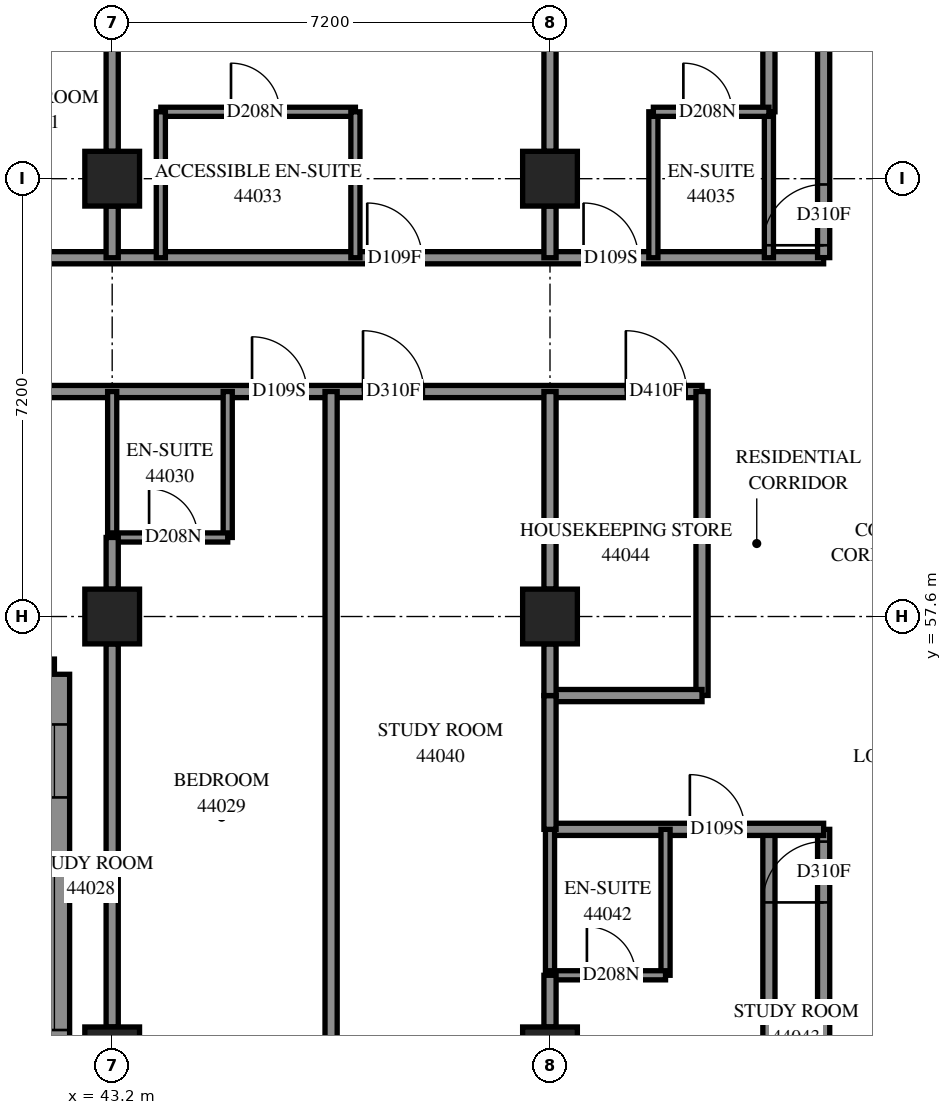
"""IFC4 building model, lengths in metres.
Left out: names, types, materials, properties, quantities, classifications, styles, units other than length and angle.
Written with IfcOpenShell. Run it as: python <this file> out.ifc"""

import sys

from ifc_helpers import new_model, si_unit, direction, frame, frame_2d, origin, origin_2d, place, context, subcontext, project, spatial, polyline, rectangle, outline, extrude, element, fill, save


model = new_model("IFC4")
c1 = context("Model", 3, precision=1e-05, world=origin(), true_north=direction((0.0, 1.0)))
c2 = subcontext(c1, "Body", "Model", "MODEL_VIEW")
j1 = project(units=[si_unit("LENGTHUNIT", "METRE"), si_unit("PLANEANGLEUNIT", "RADIAN")], contexts=[c1])
p1 = place(None, origin())
s1 = spatial("IfcSite", under=j1, at=p1, CompositionType="ELEMENT")
p2 = place(p1, origin())
s2 = spatial("IfcBuilding", under=s1, at=p2, CompositionType="ELEMENT")
p3 = place(p2, frame((0.0, 0.0, 162.6)))
s3 = spatial("IfcBuildingStorey", under=s2, at=p3, CompositionType="ELEMENT", Elevation=162.6)
for number, where, z_axis, x_axis in (
    (1, (43.2, 50.4, 0.0), (0.0, 0.0, 1.0), (1.0, 0.0, 0.0)),
    (2, (43.2, 57.6, 0.0), (0.0, 0.0, 1.0), (1.0, 0.0, 0.0)),
    (3, (43.2, 64.8, 0.0), (0.0, 0.0, 1.0), (1.0, 0.0, 0.0)),
    (4, (50.4, 50.4, 0.0), (0.0, 0.0, 1.0), (1.0, 0.0, 0.0)),
    (5, (50.4, 57.6, 0.0), (0.0, 0.0, 1.0), (1.0, 0.0, 0.0)),
    (6, (50.4, 64.8, 0.0), (0.0, 0.0, 1.0), (1.0, 0.0, 0.0)),
):
    element("IfcColumn", number, at=place(p3, frame(where, z_axis=z_axis, x_axis=x_axis)), inside=s3, PredefinedType="COLUMN", context=c2, shape_type="SweptSolid", body=[
        extrude(rectangle(XDim=0.9, YDim=0.9, at=origin_2d()), origin(), (0.0, 0.0, 1.0), 3.1),
    ])
p4 = place(p3, frame((35.05, 56.65, 0.0), z_axis=(0.0, 0.0, 1.0), x_axis=(1.0, 0.0, 0.0)))
e7 = element("IfcWall", 7, at=p4, inside=s3, PredefinedType="SOLIDWALL", context=c2, shape_type="SweptSolid", body=[
    extrude(outline(polyline([(-0.25, -0.25), (6.95, -0.25), (7.45, 0.25), (0.25, 0.25), (-0.25, -0.25)])), origin(), (0.0, 0.0, 1.0), 3.1),
])
p5 = place(p4, frame((1.35, 0.0, 0.45)))
e8 = element("IfcOpeningElement", 8, at=p5, cuts=e7, PredefinedType="OPENING", context=c2, shape_type="SweptSolid", body=[
    extrude(rectangle(XDim=2.8, YDim=2.5, at=frame_2d((1.4, 1.25))), frame((0.0, 0.26, 0.0), z_axis=(0.0, -1.0, 0.0), x_axis=(1.0, 0.0, 0.0)), (0.0, 0.0, 1.0), 0.52),
])
p6 = place(p4, frame((5.175, 0.0, 0.45)))
e9 = element("IfcOpeningElement", 9, at=p6, cuts=e7, PredefinedType="OPENING", context=c2, shape_type="SweptSolid", body=[
    extrude(rectangle(XDim=1.2, YDim=2.5, at=frame_2d((0.6, 1.25))), frame((0.0, 0.26, 0.0), z_axis=(0.0, -1.0, 0.0), x_axis=(1.0, 0.0, 0.0)), (0.0, 0.0, 1.0), 0.52),
])
p7 = place(p3, frame((42.25, 56.65, 0.0), z_axis=(0.0, 0.0, 1.0), x_axis=(0.0, -1.0, 0.0)))
e10 = element("IfcWall", 10, at=p7, inside=s3, PredefinedType="SOLIDWALL", context=c2, shape_type="SweptSolid", body=[
    extrude(outline(polyline([(0.25, -0.25), (7.45, -0.25), (6.95, 0.25), (-0.25, 0.25), (0.25, -0.25)])), origin(), (0.0, 0.0, 1.0), 3.1),
])
p8 = place(p7, frame((3.05, 0.0, 0.45)))
e11 = element("IfcOpeningElement", 11, at=p8, cuts=e10, PredefinedType="OPENING", context=c2, shape_type="SweptSolid", body=[
    extrude(rectangle(XDim=2.8, YDim=2.5, at=frame_2d((1.4, 1.25))), frame((0.0, 0.26, 0.0), z_axis=(0.0, -1.0, 0.0), x_axis=(1.0, 0.0, 0.0)), (0.0, 0.0, 1.0), 0.52),
])
p9 = place(p7, frame((0.825, 0.0, 0.45)))
e12 = element("IfcOpeningElement", 12, at=p9, cuts=e10, PredefinedType="OPENING", context=c2, shape_type="SweptSolid", body=[
    extrude(rectangle(XDim=1.2, YDim=2.5, at=frame_2d((0.6, 1.25))), frame((0.0, 0.26, 0.0), z_axis=(0.0, -1.0, 0.0), x_axis=(1.0, 0.0, 0.0)), (0.0, 0.0, 1.0), 0.52),
])
p10 = place(p3, frame((36.0, 61.3, 0.0), z_axis=(0.0, 0.0, 1.0), x_axis=(1.0, 0.0, 0.0)))
e13 = element("IfcWall", 13, at=p10, inside=s3, PredefinedType="PARTITIONING", context=c2, shape_type="SweptSolid", body=[
    extrude(rectangle(XDim=16.9, YDim=0.2, at=frame_2d((8.45, 0.0))), origin(), (0.0, 0.0, 1.0), 3.1),
])
p11 = place(p10, frame((2.3, 0.0, 0.0)))
e14 = element("IfcOpeningElement", 14, at=p11, cuts=e13, PredefinedType="OPENING", context=c2, shape_type="SweptSolid", body=[
    extrude(rectangle(XDim=0.9, YDim=2.1, at=frame_2d((0.45, 1.05))), frame((0.0, 0.11, 0.0), z_axis=(0.0, -1.0, 0.0), x_axis=(1.0, 0.0, 0.0)), (0.0, 0.0, 1.0), 0.22),
])
p12 = place(p10, frame((4.125, 0.0, 0.0)))
e15 = element("IfcOpeningElement", 15, at=p12, cuts=e13, PredefinedType="OPENING", context=c2, shape_type="SweptSolid", body=[
    extrude(rectangle(XDim=1.0, YDim=2.1, at=frame_2d((0.5, 1.05))), frame((0.0, 0.11, 0.0), z_axis=(0.0, -1.0, 0.0), x_axis=(1.0, 0.0, 0.0)), (0.0, 0.0, 1.0), 0.22),
])
p13 = place(p10, frame((9.5, 0.0, 0.0)))
e16 = element("IfcOpeningElement", 16, at=p13, cuts=e13, PredefinedType="OPENING", context=c2, shape_type="SweptSolid", body=[
    extrude(rectangle(XDim=0.9, YDim=2.1, at=frame_2d((0.45, 1.05))), frame((0.0, 0.11, 0.0), z_axis=(0.0, -1.0, 0.0), x_axis=(1.0, 0.0, 0.0)), (0.0, 0.0, 1.0), 0.22),
])
p14 = place(p10, frame((11.325, 0.0, 0.0)))
e17 = element("IfcOpeningElement", 17, at=p14, cuts=e13, PredefinedType="OPENING", context=c2, shape_type="SweptSolid", body=[
    extrude(rectangle(XDim=1.0, YDim=2.1, at=frame_2d((0.5, 1.05))), frame((0.0, 0.11, 0.0), z_axis=(0.0, -1.0, 0.0), x_axis=(1.0, 0.0, 0.0)), (0.0, 0.0, 1.0), 0.22),
])
p15 = place(p10, frame((15.647, 0.0, 0.0)))
e18 = element("IfcOpeningElement", 18, at=p15, cuts=e13, PredefinedType="OPENING", context=c2, shape_type="SweptSolid", body=[
    extrude(rectangle(XDim=1.0, YDim=2.1, at=frame_2d((0.5, 1.05))), frame((0.0, 0.11, 0.0), z_axis=(0.0, -1.0, 0.0), x_axis=(1.0, 0.0, 0.0)), (0.0, 0.0, 1.0), 0.22),
])
p16 = place(p3, frame((40.702, 63.5, 0.0), z_axis=(0.0, 0.0, 1.0), x_axis=(1.0, 0.0, 0.0)))
e19 = element("IfcWall", 19, at=p16, inside=s3, PredefinedType="PARTITIONING", context=c2, shape_type="SweptSolid", body=[
    extrude(rectangle(XDim=14.198, YDim=0.2, at=frame_2d((7.099, 0.0))), origin(), (0.0, 0.0, 1.0), 3.1),
])
p17 = place(p16, frame((6.692, 0.0, 0.0)))
e20 = element("IfcOpeningElement", 20, at=p17, cuts=e19, PredefinedType="OPENING", context=c2, shape_type="SweptSolid", body=[
    extrude(rectangle(XDim=0.9, YDim=2.1, at=frame_2d((0.45, 1.05))), frame((0.0, 0.11, 0.0), z_axis=(0.0, -1.0, 0.0), x_axis=(1.0, 0.0, 0.0)), (0.0, 0.0, 1.0), 0.22),
])
p18 = place(p16, frame((10.25, 0.0, 0.0)))
e21 = element("IfcOpeningElement", 21, at=p18, cuts=e19, PredefinedType="OPENING", context=c2, shape_type="SweptSolid", body=[
    extrude(rectangle(XDim=0.9, YDim=2.1, at=frame_2d((0.45, 1.05))), frame((0.0, 0.11, 0.0), z_axis=(0.0, -1.0, 0.0), x_axis=(1.0, 0.0, 0.0)), (0.0, 0.0, 1.0), 0.22),
])
p19 = place(p3, frame((54.0, 42.285, 0.0), z_axis=(0.0, 0.0, 1.0), x_axis=(0.0, 1.0, 0.0)))
e22 = element("IfcWall", 22, at=p19, inside=s3, PredefinedType="PARTITIONING", context=c2, shape_type="SweptSolid", body=[
    extrude(rectangle(XDim=11.815, YDim=0.2, at=frame_2d((5.907, 0.0))), origin(), (0.0, 0.0, 1.0), 3.1),
])
p20 = place(p3, frame((46.8, 49.7, 0.0), z_axis=(0.0, 0.0, 1.0), x_axis=(0.0, 1.0, 0.0)))
e23 = element("IfcWall", 23, at=p20, inside=s3, PredefinedType="PARTITIONING", context=c2, shape_type="SweptSolid", body=[
    extrude(rectangle(XDim=11.6, YDim=0.2, at=frame_2d((5.8, 0.0))), origin(), (0.0, 0.0, 1.0), 3.1),
])
p21 = place(p3, frame((54.0, 65.9, 0.0), z_axis=(0.0, 0.0, 1.0), x_axis=(0.0, 1.0, 0.0)))
e24 = element("IfcWall", 24, at=p21, inside=s3, PredefinedType="PARTITIONING", context=c2, shape_type="SweptSolid", body=[
    extrude(rectangle(XDim=6.863, YDim=0.2, at=frame_2d((3.432, 0.0))), origin(), (0.0, 0.0, 1.0), 3.1),
])
p22 = place(p3, frame((54.9, 47.7, 0.0), z_axis=(0.0, 0.0, 1.0), x_axis=(0.0, 1.0, 0.0)))
e25 = element("IfcWall", 25, at=p22, inside=s3, PredefinedType="PARTITIONING", context=c2, shape_type="SweptSolid", body=[
    extrude(rectangle(XDim=6.4, YDim=0.2, at=frame_2d((3.2, 0.0))), origin(), (0.0, 0.0, 1.0), 3.1),
])
p23 = place(p22, frame((5.199, 0.0, 0.0)))
e26 = element("IfcOpeningElement", 26, at=p23, cuts=e25, PredefinedType="OPENING", context=c2, shape_type="SweptSolid", body=[
    extrude(rectangle(XDim=1.0, YDim=2.1, at=frame_2d((0.5, 1.05))), frame((0.0, 0.11, 0.0), z_axis=(0.0, -1.0, 0.0), x_axis=(1.0, 0.0, 0.0)), (0.0, 0.0, 1.0), 0.22),
])
p24 = place(p3, frame((43.2, 50.85, 0.0), z_axis=(0.0, 0.0, 1.0), x_axis=(0.0, 1.0, 0.0)))
e27 = element("IfcWall", 27, at=p24, inside=s3, PredefinedType="PARTITIONING", context=c2, shape_type="SweptSolid", body=[
    extrude(rectangle(XDim=6.3, YDim=0.2, at=frame_2d((3.15, 0.0))), origin(), (0.0, 0.0, 1.0), 2.6),
])
for number, where, z_axis, x_axis in (
    (28, (43.2, 65.25, 0.0), (0.0, 0.0, 1.0), (0.0, 1.0, 0.0)),
    (29, (50.4, 65.25, 0.0), (0.0, 0.0, 1.0), (0.0, 1.0, 0.0)),
):
    element("IfcWall", number, at=place(p3, frame(where, z_axis=z_axis, x_axis=x_axis)), inside=s3, PredefinedType="PARTITIONING", context=c2, shape_type="SweptSolid", body=[
        extrude(rectangle(XDim=6.3, YDim=0.2, at=frame_2d((3.15, 0.0))), origin(), (0.0, 0.0, 1.0), 3.1),
    ])
p25 = place(p3, frame((52.9, 56.302, 0.0), z_axis=(0.0, 0.0, 1.0), x_axis=(0.0, 1.0, 0.0)))
e30 = element("IfcWall", 30, at=p25, inside=s3, PredefinedType="PARTITIONING", context=c2, shape_type="SweptSolid", body=[
    extrude(rectangle(XDim=4.998, YDim=0.2, at=frame_2d((2.499, 0.0))), origin(), (0.0, 0.0, 1.0), 3.1),
])
p26 = place(p3, frame((50.4, 54.1, 0.0), z_axis=(0.0, 0.0, 1.0), x_axis=(1.0, 0.0, 0.0)))
e31 = element("IfcWall", 31, at=p26, inside=s3, PredefinedType="PARTITIONING", context=c2, shape_type="SweptSolid", body=[
    extrude(rectangle(XDim=4.5, YDim=0.2, at=frame_2d((2.25, 0.0))), origin(), (0.0, 0.0, 1.0), 3.1),
])
p27 = place(p26, frame((2.3, 0.0, 0.0)))
e32 = element("IfcOpeningElement", 32, at=p27, cuts=e31, PredefinedType="OPENING", context=c2, shape_type="SweptSolid", body=[
    extrude(rectangle(XDim=0.9, YDim=2.1, at=frame_2d((0.45, 1.05))), frame((0.0, 0.11, 0.0), z_axis=(0.0, -1.0, 0.0), x_axis=(1.0, 0.0, 0.0)), (0.0, 0.0, 1.0), 0.22),
])
p28 = place(p3, frame((54.9, 63.502, 0.0), z_axis=(0.0, 0.0, 1.0), x_axis=(0.0, 1.0, 0.0)))
e33 = element("IfcWall", 33, at=p28, inside=s3, PredefinedType="PARTITIONING", context=c2, shape_type="SweptSolid", body=[
    extrude(rectangle(XDim=3.998, YDim=0.2, at=frame_2d((1.999, 0.0))), origin(), (0.0, 0.0, 1.0), 3.1),
])
p29 = place(p28, frame((0.203, 0.0, 0.0)))
e34 = element("IfcOpeningElement", 34, at=p29, cuts=e33, PredefinedType="OPENING", context=c2, shape_type="SweptSolid", body=[
    extrude(rectangle(XDim=1.0, YDim=2.1, at=frame_2d((0.5, 1.05))), frame((0.0, 0.11, 0.0), z_axis=(0.0, -1.0, 0.0), x_axis=(1.0, 0.0, 0.0)), (0.0, 0.0, 1.0), 0.22),
])
p30 = place(p3, frame((50.4, 58.05, 0.0), z_axis=(0.0, 0.0, 1.0), x_axis=(0.0, 1.0, 0.0)))
e35 = element("IfcWall", 35, at=p30, inside=s3, PredefinedType="PARTITIONING", context=c2, shape_type="SweptSolid", body=[
    extrude(rectangle(XDim=3.25, YDim=0.2, at=frame_2d((1.625, 0.0))), origin(), (0.0, 0.0, 1.0), 3.1),
])
p31 = place(p3, frame((44.0, 65.9, 0.0), z_axis=(0.0, 0.0, 1.0), x_axis=(1.0, 0.0, 0.0)))
e36 = element("IfcWall", 36, at=p31, inside=s3, PredefinedType="PARTITIONING", context=c2, shape_type="SweptSolid", body=[
    extrude(rectangle(XDim=3.2, YDim=0.15, at=frame_2d((1.6, 0.0))), origin(), (0.0, 0.0, 1.0), 3.1),
])
p32 = place(p31, frame((1.154, 0.0, 0.0)))
e37 = element("IfcOpeningElement", 37, at=p32, cuts=e36, PredefinedType="OPENING", context=c2, shape_type="SweptSolid", body=[
    extrude(rectangle(XDim=0.8, YDim=2.1, at=frame_2d((0.4, 1.05))), frame((0.0, 0.085, 0.0), z_axis=(0.0, -1.0, 0.0), x_axis=(1.0, 0.0, 0.0)), (0.0, 0.0, 1.0), 0.17),
])
p33 = place(p3, frame((50.4, 56.3, 0.0), z_axis=(0.0, 0.0, 1.0), x_axis=(1.0, 0.0, 0.0)))
e38 = element("IfcWall", 38, at=p33, inside=s3, PredefinedType="PARTITIONING", context=c2, shape_type="SweptSolid", body=[
    extrude(rectangle(XDim=2.5, YDim=0.2, at=frame_2d((1.25, 0.0))), origin(), (0.0, 0.0, 1.0), 3.1),
])
for number, where, z_axis, x_axis in (
    (39, (44.0, 63.5, 0.0), (0.0, 0.0, 1.0), (0.0, 1.0, 0.0)),
    (40, (47.2, 63.5, 0.0), (0.0, 0.0, 1.0), (0.0, 1.0, 0.0)),
    (41, (52.1, 63.5, 0.0), (0.0, 0.0, 1.0), (0.0, 1.0, 0.0)),
    (42, (54.0, 63.5, 0.0), (0.0, 0.0, 1.0), (0.0, 1.0, 0.0)),
    (43, (45.1, 58.9, 0.0), (0.0, 0.0, 1.0), (0.0, 1.0, 0.0)),
    (44, (43.2, 58.9, 0.0), (0.0, 0.0, 1.0), (0.0, 1.0, 0.0)),
    (45, (52.3, 51.7, 0.0), (0.0, 0.0, 1.0), (0.0, 1.0, 0.0)),
    (46, (50.4, 51.7, 0.0), (0.0, 0.0, 1.0), (0.0, 1.0, 0.0)),
):
    element("IfcWall", number, at=place(p3, frame(where, z_axis=z_axis, x_axis=x_axis)), inside=s3, PredefinedType="PARTITIONING", context=c2, shape_type="SweptSolid", body=[
        extrude(rectangle(XDim=2.4, YDim=0.15, at=frame_2d((1.2, 0.0))), origin(), (0.0, 0.0, 1.0), 3.1),
    ])
p34 = place(p3, frame((50.4, 54.1, 0.0), z_axis=(0.0, 0.0, 1.0), x_axis=(0.0, 1.0, 0.0)))
e47 = element("IfcWall", 47, at=p34, inside=s3, PredefinedType="PARTITIONING", context=c2, shape_type="SweptSolid", body=[
    extrude(rectangle(XDim=2.2, YDim=0.2, at=frame_2d((1.1, 0.0))), origin(), (0.0, 0.0, 1.0), 3.1),
])
p35 = place(p3, frame((43.2, 58.9, 0.0), z_axis=(0.0, 0.0, 1.0), x_axis=(1.0, 0.0, 0.0)))
e48 = element("IfcWall", 48, at=p35, inside=s3, PredefinedType="PARTITIONING", context=c2, shape_type="SweptSolid", body=[
    extrude(rectangle(XDim=1.9, YDim=0.15, at=frame_2d((0.95, 0.0))), origin(), (0.0, 0.0, 1.0), 3.1),
])
p36 = place(p35, frame((0.607, 0.0, 0.0)))
e49 = element("IfcOpeningElement", 49, at=p36, cuts=e48, PredefinedType="OPENING", context=c2, shape_type="SweptSolid", body=[
    extrude(rectangle(XDim=0.8, YDim=2.1, at=frame_2d((0.4, 1.05))), frame((0.0, 0.085, 0.0), z_axis=(0.0, -1.0, 0.0), x_axis=(1.0, 0.0, 0.0)), (0.0, 0.0, 1.0), 0.17),
])
p37 = place(p3, frame((52.1, 65.9, 0.0), z_axis=(0.0, 0.0, 1.0), x_axis=(1.0, 0.0, 0.0)))
e50 = element("IfcWall", 50, at=p37, inside=s3, PredefinedType="PARTITIONING", context=c2, shape_type="SweptSolid", body=[
    extrude(rectangle(XDim=1.9, YDim=0.15, at=frame_2d((0.95, 0.0))), origin(), (0.0, 0.0, 1.0), 3.1),
])
p38 = place(p37, frame((0.493, 0.0, 0.0)))
e51 = element("IfcOpeningElement", 51, at=p38, cuts=e50, PredefinedType="OPENING", context=c2, shape_type="SweptSolid", body=[
    extrude(rectangle(XDim=0.8, YDim=2.1, at=frame_2d((0.4, 1.05))), frame((0.0, 0.085, 0.0), z_axis=(0.0, -1.0, 0.0), x_axis=(1.0, 0.0, 0.0)), (0.0, 0.0, 1.0), 0.17),
])
p39 = place(p3, frame((50.4, 51.7, 0.0), z_axis=(0.0, 0.0, 1.0), x_axis=(1.0, 0.0, 0.0)))
e52 = element("IfcWall", 52, at=p39, inside=s3, PredefinedType="PARTITIONING", context=c2, shape_type="SweptSolid", body=[
    extrude(rectangle(XDim=1.9, YDim=0.15, at=frame_2d((0.95, 0.0))), origin(), (0.0, 0.0, 1.0), 3.1),
])
p40 = place(p39, frame((0.607, 0.0, 0.0)))
e53 = element("IfcOpeningElement", 53, at=p40, cuts=e52, PredefinedType="OPENING", context=c2, shape_type="SweptSolid", body=[
    extrude(rectangle(XDim=0.8, YDim=2.1, at=frame_2d((0.4, 1.05))), frame((0.0, 0.085, 0.0), z_axis=(0.0, -1.0, 0.0), x_axis=(1.0, 0.0, 0.0)), (0.0, 0.0, 1.0), 0.17),
])
for number, where, z_axis, x_axis in (
    (54, (43.2, 58.05, 0.0), (0.0, 0.0, 1.0), (0.0, 1.0, 0.0)),
    (55, (50.4, 50.85, 0.0), (0.0, 0.0, 1.0), (0.0, 1.0, 0.0)),
    (56, (50.4, 56.3, 0.0), (0.0, 0.0, 1.0), (0.0, 1.0, 0.0)),
    (57, (43.2, 63.5, 0.0), (0.0, 0.0, 1.0), (0.0, 1.0, 0.0)),
    (58, (50.4, 63.5, 0.0), (0.0, 0.0, 1.0), (0.0, 1.0, 0.0)),
):
    element("IfcWall", number, at=place(p3, frame(where, z_axis=z_axis, x_axis=x_axis)), inside=s3, PredefinedType="PARTITIONING", context=c2, shape_type="SweptSolid", body=[
        extrude(rectangle(XDim=0.85, YDim=0.2, at=frame_2d((0.425, 0.0))), origin(), (0.0, 0.0, 1.0), 3.1),
    ])
p41 = place(p8, origin())
e59 = element("IfcWindow", 59, at=p41, inside=s3, PartitioningType="SINGLE_PANEL", PredefinedType="WINDOW", context=c2, shape_type="SweptSolid", body=[
    extrude(rectangle(XDim=2.8, YDim=2.5, at=frame_2d((1.4, 1.25))), frame((0.0, 0.18, 0.0), z_axis=(0.0, -1.0, 0.0), x_axis=(1.0, 0.0, 0.0)), (0.0, 0.0, 1.0), 0.06),
])
fill(e11, e59)
p42 = place(p9, origin())
e60 = element("IfcWindow", 60, at=p42, inside=s3, PartitioningType="SINGLE_PANEL", PredefinedType="WINDOW", context=c2, shape_type="SweptSolid", body=[
    extrude(rectangle(XDim=1.2, YDim=2.5, at=frame_2d((0.6, 1.25))), frame((0.0, 0.18, 0.0), z_axis=(0.0, -1.0, 0.0), x_axis=(1.0, 0.0, 0.0)), (0.0, 0.0, 1.0), 0.06),
])
fill(e12, e60)
p43 = place(p13, origin())
e61 = element("IfcDoor", 61, at=p43, inside=s3, OperationType="SINGLE_SWING_LEFT", PredefinedType="DOOR", context=c2, shape_type="SweptSolid", body=[
    extrude(rectangle(XDim=0.9, YDim=2.1, at=frame_2d((0.45, 1.05))), frame((0.0, 0.025, 0.0), z_axis=(0.0, -1.0, 0.0), x_axis=(1.0, 0.0, 0.0)), (0.0, 0.0, 1.0), 0.05),
])
fill(e16, e61)
p44 = place(p36, origin())
e62 = element("IfcDoor", 62, at=p44, inside=s3, OperationType="SINGLE_SWING_RIGHT", PredefinedType="DOOR", context=c2, shape_type="SweptSolid", body=[
    extrude(rectangle(XDim=0.8, YDim=2.1, at=frame_2d((0.4, 1.05))), frame((0.0, 0.025, 0.0), z_axis=(0.0, -1.0, 0.0), x_axis=(1.0, 0.0, 0.0)), (0.0, 0.0, 1.0), 0.05),
])
fill(e49, e62)
p45 = place(p17, origin())
e63 = element("IfcDoor", 63, at=p45, inside=s3, OperationType="SINGLE_SWING_RIGHT", PredefinedType="DOOR", context=c2, shape_type="SweptSolid", body=[
    extrude(rectangle(XDim=0.9, YDim=2.1, at=frame_2d((0.45, 1.05))), frame((0.0, 0.025, 0.0), z_axis=(0.0, -1.0, 0.0), x_axis=(1.0, 0.0, 0.0)), (0.0, 0.0, 1.0), 0.05),
])
fill(e20, e63)
p46 = place(p32, origin())
e64 = element("IfcDoor", 64, at=p46, inside=s3, OperationType="SINGLE_SWING_RIGHT", PredefinedType="DOOR", context=c2, shape_type="SweptSolid", body=[
    extrude(rectangle(XDim=0.8, YDim=2.1, at=frame_2d((0.4, 1.05))), frame((0.0, 0.025, 0.0), z_axis=(0.0, -1.0, 0.0), x_axis=(1.0, 0.0, 0.0)), (0.0, 0.0, 1.0), 0.05),
])
fill(e37, e64)
p47 = place(p18, origin())
e65 = element("IfcDoor", 65, at=p47, inside=s3, OperationType="SINGLE_SWING_RIGHT", PredefinedType="DOOR", context=c2, shape_type="SweptSolid", body=[
    extrude(rectangle(XDim=0.9, YDim=2.1, at=frame_2d((0.45, 1.05))), frame((0.0, 0.025, 0.0), z_axis=(0.0, -1.0, 0.0), x_axis=(1.0, 0.0, 0.0)), (0.0, 0.0, 1.0), 0.05),
])
fill(e21, e65)
p48 = place(p38, origin())
e66 = element("IfcDoor", 66, at=p48, inside=s3, OperationType="SINGLE_SWING_RIGHT", PredefinedType="DOOR", context=c2, shape_type="SweptSolid", body=[
    extrude(rectangle(XDim=0.8, YDim=2.1, at=frame_2d((0.4, 1.05))), frame((0.0, 0.025, 0.0), z_axis=(0.0, -1.0, 0.0), x_axis=(1.0, 0.0, 0.0)), (0.0, 0.0, 1.0), 0.05),
])
fill(e51, e66)
p49 = place(p29, origin())
e67 = element("IfcDoor", 67, at=p49, inside=s3, OperationType="SINGLE_SWING_LEFT", PredefinedType="DOOR", context=c2, shape_type="SweptSolid", body=[
    extrude(rectangle(XDim=1.0, YDim=2.1, at=frame_2d((0.5, 1.05))), frame((0.0, 0.025, 0.0), z_axis=(0.0, -1.0, 0.0), x_axis=(1.0, 0.0, 0.0)), (0.0, 0.0, 1.0), 0.05),
])
fill(e34, e67)
p50 = place(p14, origin())
e68 = element("IfcDoor", 68, at=p50, inside=s3, OperationType="SINGLE_SWING_RIGHT", PredefinedType="DOOR", context=c2, shape_type="SweptSolid", body=[
    extrude(rectangle(XDim=1.0, YDim=2.1, at=frame_2d((0.5, 1.05))), frame((0.0, 0.025, 0.0), z_axis=(0.0, -1.0, 0.0), x_axis=(1.0, 0.0, 0.0)), (0.0, 0.0, 1.0), 0.05),
])
fill(e17, e68)
p51 = place(p27, origin())
e69 = element("IfcDoor", 69, at=p51, inside=s3, OperationType="SINGLE_SWING_LEFT", PredefinedType="DOOR", context=c2, shape_type="SweptSolid", body=[
    extrude(rectangle(XDim=0.9, YDim=2.1, at=frame_2d((0.45, 1.05))), frame((0.0, 0.025, 0.0), z_axis=(0.0, -1.0, 0.0), x_axis=(1.0, 0.0, 0.0)), (0.0, 0.0, 1.0), 0.05),
])
fill(e32, e69)
p52 = place(p40, origin())
e70 = element("IfcDoor", 70, at=p52, inside=s3, OperationType="SINGLE_SWING_RIGHT", PredefinedType="DOOR", context=c2, shape_type="SweptSolid", body=[
    extrude(rectangle(XDim=0.8, YDim=2.1, at=frame_2d((0.4, 1.05))), frame((0.0, 0.025, 0.0), z_axis=(0.0, -1.0, 0.0), x_axis=(1.0, 0.0, 0.0)), (0.0, 0.0, 1.0), 0.05),
])
fill(e53, e70)
p53 = place(p23, origin())
e71 = element("IfcDoor", 71, at=p53, inside=s3, OperationType="SINGLE_SWING_RIGHT", PredefinedType="DOOR", context=c2, shape_type="SweptSolid", body=[
    extrude(rectangle(XDim=1.0, YDim=2.1, at=frame_2d((0.5, 1.05))), frame((0.0, 0.025, 0.0), z_axis=(0.0, -1.0, 0.0), x_axis=(1.0, 0.0, 0.0)), (0.0, 0.0, 1.0), 0.05),
])
fill(e26, e71)
p54 = place(p15, origin())
e72 = element("IfcDoor", 72, at=p54, inside=s3, OperationType="SINGLE_SWING_LEFT", PredefinedType="DOOR", context=c2, shape_type="SweptSolid", body=[
    extrude(rectangle(XDim=1.0, YDim=2.1, at=frame_2d((0.5, 1.05))), frame((0.0, 0.025, 0.0), z_axis=(0.0, -1.0, 0.0), x_axis=(1.0, 0.0, 0.0)), (0.0, 0.0, 1.0), 0.05),
])
fill(e18, e72)
save(model, sys.argv[1])
